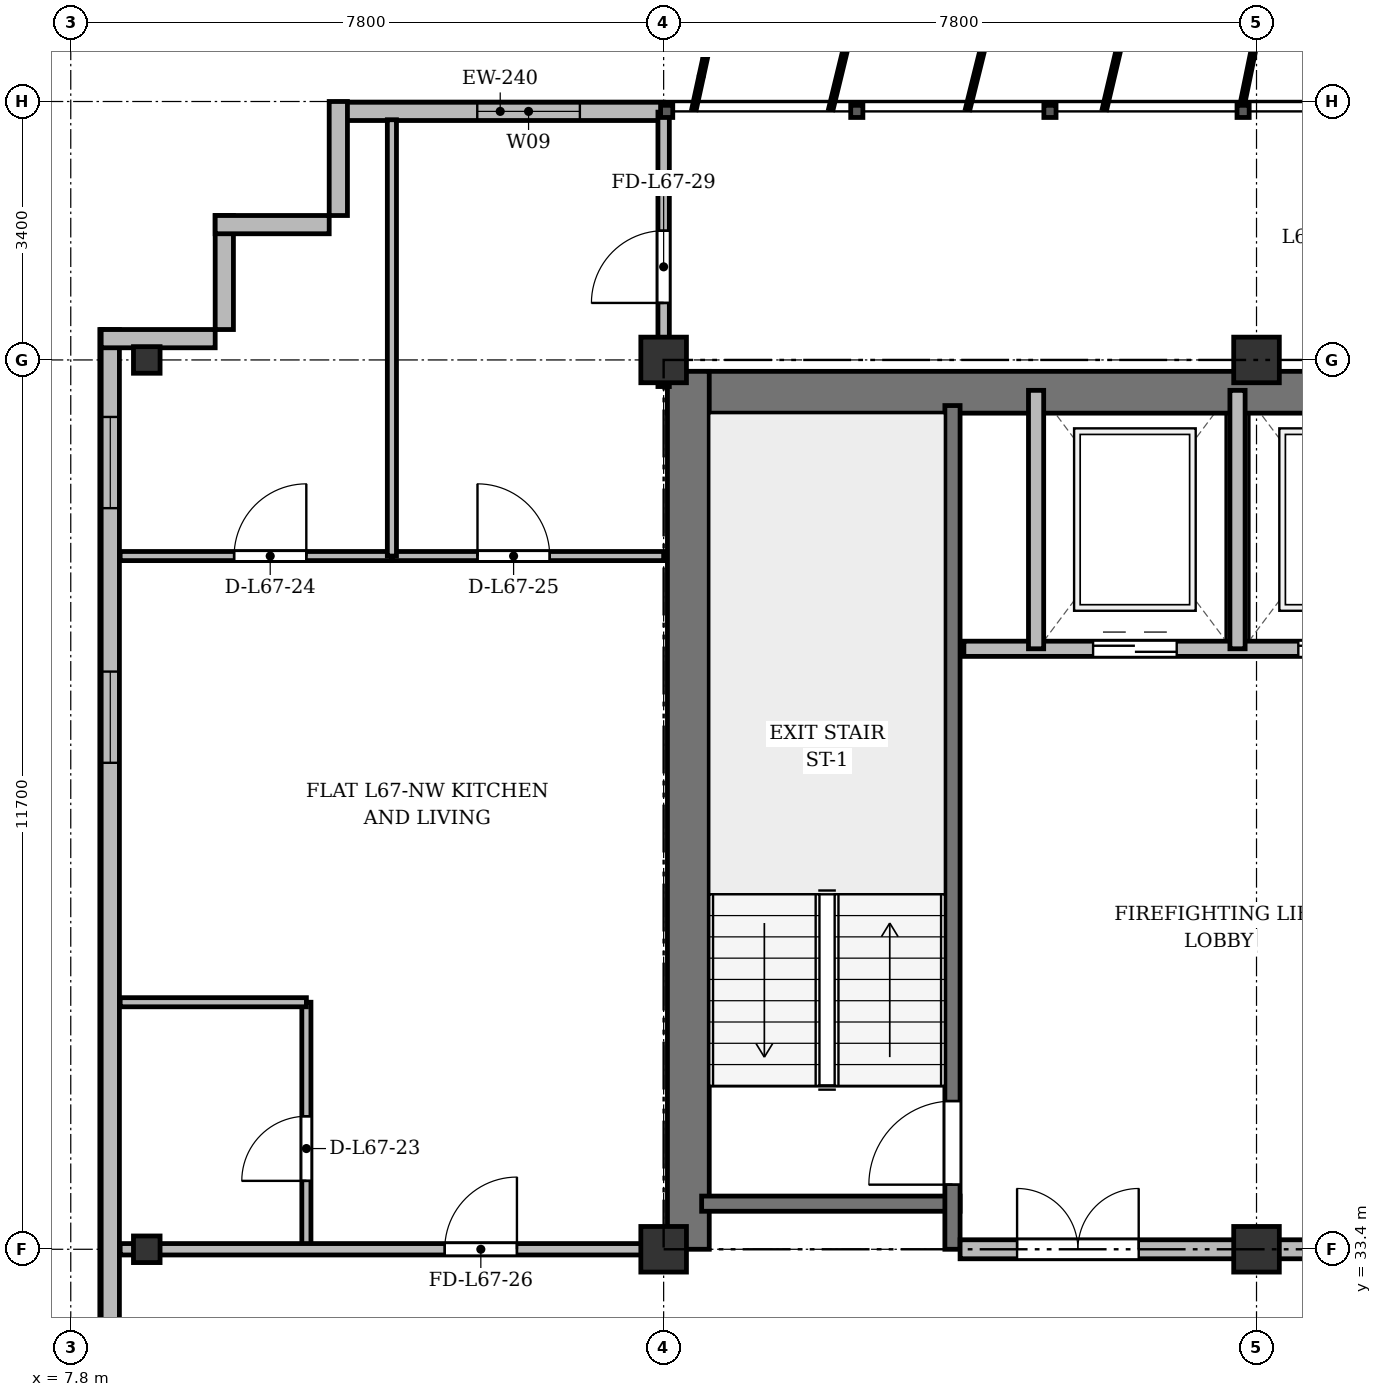
"""IFC4 building model, lengths in metres.
Left out: names, types, materials, properties, quantities, classifications, styles, units other than length and angle.
Written with IfcOpenShell. Run it as: python <this file> out.ifc"""

import sys

from ifc_helpers import new_model, si_unit, direction, frame, frame_2d, origin, origin_2d, place, context, subcontext, project, spatial, rectangle, i_section, extrude, source, transform, mapped, element, fill, save


model = new_model("IFC4")
c1 = context("Model", 3, precision=1e-05, world=origin(), true_north=direction((0.0, 1.0)))
c2 = subcontext(c1, "Body", "Model", "MODEL_VIEW")
j1 = project(units=[si_unit("LENGTHUNIT", "METRE"), si_unit("PLANEANGLEUNIT", "RADIAN")], contexts=[c1])
p1 = place(None, origin())
s1 = spatial("IfcSite", under=j1, at=p1, CompositionType="ELEMENT")
p2 = place(p1, origin())
s2 = spatial("IfcBuilding", under=s1, at=p2, CompositionType="ELEMENT")
p3 = place(p2, frame((0.0, 0.0, 259.5)))
s3 = spatial("IfcBuildingStorey", under=s2, at=p3, CompositionType="ELEMENT", Elevation=259.5)
m1 = source(origin(), c2, "Body", "SweptSolid", [
    extrude(i_section(OverallWidth=0.35, OverallDepth=0.35, WebThickness=0.018, FlangeThickness=0.028, at=origin_2d()), origin(), (0.0, 0.0, 1.0), 3.6),
])
for number, where, z_axis, x_axis in (
    (1, (8.8, 33.4, 0.0), (0.0, 0.0, 1.0), (1.0, 0.0, 0.0)),
    (2, (8.8, 45.1, 0.0), (0.0, 0.0, 1.0), (1.0, 0.0, 0.0)),
):
    element("IfcColumn", number, at=place(p3, frame(where, z_axis=z_axis, x_axis=x_axis)), inside=s3, PredefinedType="COLUMN", context=c2, shape_type="MappedRepresentation", body=[
        mapped(m1, transform((0.0, 0.0, 0.0), x_axis=(1.0, 0.0, 0.0), y_axis=(0.0, 1.0, 0.0), z_axis=(0.0, 0.0, 1.0), scale=1.0)),
    ])
m2 = source(origin(), c2, "Body", "SweptSolid", [
    extrude(rectangle(XDim=0.6, YDim=0.6, at=origin_2d()), origin(), (0.0, 0.0, 1.0), 3.6),
])
for number, where, z_axis, x_axis in (
    (3, (15.6, 33.4, 0.0), (0.0, 0.0, 1.0), (1.0, 0.0, 0.0)),
    (4, (15.6, 45.1, 0.0), (0.0, 0.0, 1.0), (1.0, 0.0, 0.0)),
    (5, (23.4, 33.4, 0.0), (0.0, 0.0, 1.0), (1.0, 0.0, 0.0)),
    (6, (23.4, 45.1, 0.0), (0.0, 0.0, 1.0), (1.0, 0.0, 0.0)),
):
    element("IfcColumn", number, at=place(p3, frame(where, z_axis=z_axis, x_axis=x_axis)), inside=s3, PredefinedType="COLUMN", context=c2, shape_type="MappedRepresentation", body=[
        mapped(m2, transform((0.0, 0.0, 0.0), x_axis=(1.0, 0.0, 0.0), y_axis=(0.0, 1.0, 0.0), z_axis=(0.0, 0.0, 1.0), scale=1.0)),
    ])
p4 = place(p3, frame((11.3, 48.37, 0.0), z_axis=(0.0, 0.0, 1.0), x_axis=(1.0, 0.0, 0.0)))
e7 = element("IfcWall", 7, at=p4, inside=s3, PredefinedType="SOLIDWALL", context=c2, shape_type="SweptSolid", body=[
    extrude(rectangle(XDim=4.3, YDim=0.24, at=frame_2d((2.15, 0.0))), origin(), (0.0, 0.0, 1.0), 3.37),
])
p5 = place(p4, frame((1.848, 0.0, 0.9)))
e8 = element("IfcOpeningElement", 8, at=p5, cuts=e7, PredefinedType="OPENING", context=c2, shape_type="SweptSolid", body=[
    extrude(rectangle(XDim=1.35, YDim=1.5, at=frame_2d((0.675, 0.75))), frame((0.0, 0.13, 0.0), z_axis=(0.0, -1.0, 0.0), x_axis=(1.0, 0.0, 0.0)), (0.0, 0.0, 1.0), 0.26),
])
p6 = place(p3, frame((8.32, 6.5, 0.0), z_axis=(0.0, 0.0, 1.0), x_axis=(0.0, 1.0, 0.0)))
e9 = element("IfcWall", 9, at=p6, inside=s3, PredefinedType="SOLIDWALL", context=c2, shape_type="SweptSolid", body=[
    extrude(rectangle(XDim=39.0, YDim=0.24, at=frame_2d((19.5, 0.0))), origin(), (0.0, 0.0, 1.0), 3.37),
])
p7 = place(p6, frame((1.45, 0.0, 0.92)))
e10 = element("IfcOpeningElement", 10, at=p7, cuts=e9, PredefinedType="OPENING", context=c2, shape_type="SweptSolid", body=[
    extrude(rectangle(XDim=1.2, YDim=1.65, at=frame_2d((0.6, 0.825))), frame((0.0, 0.13, 0.0), z_axis=(0.0, -1.0, 0.0), x_axis=(1.0, 0.0, 0.0)), (0.0, 0.0, 1.0), 0.26),
])
p8 = place(p6, frame((3.7, 0.0, 0.92)))
e11 = element("IfcOpeningElement", 11, at=p8, cuts=e9, PredefinedType="OPENING", context=c2, shape_type="SweptSolid", body=[
    extrude(rectangle(XDim=2.4, YDim=2.1, at=frame_2d((1.2, 1.05))), frame((0.0, 0.13, 0.0), z_axis=(0.0, -1.0, 0.0), x_axis=(1.0, 0.0, 0.0)), (0.0, 0.0, 1.0), 0.26),
])
p9 = place(p6, frame((7.9, 0.0, 0.92)))
e12 = element("IfcOpeningElement", 12, at=p9, cuts=e9, PredefinedType="OPENING", context=c2, shape_type="SweptSolid", body=[
    extrude(rectangle(XDim=2.4, YDim=2.1, at=frame_2d((1.2, 1.05))), frame((0.0, 0.13, 0.0), z_axis=(0.0, -1.0, 0.0), x_axis=(1.0, 0.0, 0.0)), (0.0, 0.0, 1.0), 0.26),
])
p10 = place(p6, frame((15.1, 0.0, 0.92)))
e13 = element("IfcOpeningElement", 13, at=p10, cuts=e9, PredefinedType="OPENING", context=c2, shape_type="SweptSolid", body=[
    extrude(rectangle(XDim=2.4, YDim=2.1, at=frame_2d((1.2, 1.05))), frame((0.0, 0.13, 0.0), z_axis=(0.0, -1.0, 0.0), x_axis=(1.0, 0.0, 0.0)), (0.0, 0.0, 1.0), 0.26),
])
p11 = place(p6, frame((33.3, 0.0, 0.92)))
e14 = element("IfcOpeningElement", 14, at=p11, cuts=e9, PredefinedType="OPENING", context=c2, shape_type="SweptSolid", body=[
    extrude(rectangle(XDim=1.2, YDim=1.65, at=frame_2d((0.6, 0.825))), frame((0.0, 0.13, 0.0), z_axis=(0.0, -1.0, 0.0), x_axis=(1.0, 0.0, 0.0)), (0.0, 0.0, 1.0), 0.26),
])
p12 = place(p6, frame((36.65, 0.0, 0.92)))
e15 = element("IfcOpeningElement", 15, at=p12, cuts=e9, PredefinedType="OPENING", context=c2, shape_type="SweptSolid", body=[
    extrude(rectangle(XDim=1.2, YDim=1.65, at=frame_2d((0.6, 0.825))), frame((0.0, 0.13, 0.0), z_axis=(0.0, -1.0, 0.0), x_axis=(1.0, 0.0, 0.0)), (0.0, 0.0, 1.0), 0.26),
])
for number, where, z_axis, x_axis in (
    (16, (8.2, 45.38, 0.0), (0.0, 0.0, 1.0), (1.0, 0.0, 0.0)),
    (17, (9.82, 45.5, 0.0), (0.0, 0.0, 1.0), (0.0, 1.0, 0.0)),
    (18, (9.7, 46.88, 0.0), (0.0, 0.0, 1.0), (1.0, 0.0, 0.0)),
    (19, (11.32, 47.0, 0.0), (0.0, 0.0, 1.0), (0.0, 1.0, 0.0)),
):
    element("IfcWall", number, at=place(p3, frame(where, z_axis=z_axis, x_axis=x_axis)), inside=s3, PredefinedType="SOLIDWALL", context=c2, shape_type="SweptSolid", body=[
        extrude(rectangle(XDim=1.5, YDim=0.24, at=frame_2d((0.75, 0.0))), origin(), (0.0, 0.0, 1.0), 3.37),
    ])
p13 = place(p3, frame((15.65, 44.675, 0.0), z_axis=(0.0, 0.0, 1.0), x_axis=(1.0, 0.0, 0.0)))
e20 = element("IfcWall", 20, at=p13, inside=s3, PredefinedType="SHEAR", context=c2, shape_type="SweptSolid", body=[
    extrude(rectangle(XDim=43.1, YDim=0.55, at=frame_2d((21.55, 0.0))), origin(), (0.0, 0.0, 1.0), 3.37),
])
p14 = place(p3, frame((15.925, 33.4, 0.0), z_axis=(0.0, 0.0, 1.0), x_axis=(0.0, 1.0, 0.0)))
e21 = element("IfcWall", 21, at=p14, inside=s3, PredefinedType="SHEAR", context=c2, shape_type="SweptSolid", body=[
    extrude(rectangle(XDim=11.55, YDim=0.55, at=frame_2d((5.775, 0.0))), origin(), (0.0, 0.0, 1.0), 3.37),
])
p15 = place(p3, frame((16.1, 34.0, 0.0), z_axis=(0.0, 0.0, 1.0), x_axis=(1.0, 0.0, 0.0)))
e22 = element("IfcWall", 22, at=p15, inside=s3, PredefinedType="SHEAR", context=c2, shape_type="SweptSolid", body=[
    extrude(rectangle(XDim=3.4, YDim=0.2, at=frame_2d((1.7, 0.0))), origin(), (0.0, 0.0, 1.0), 3.37),
])
p16 = place(p3, frame((19.4, 33.4, 0.0), z_axis=(0.0, 0.0, 1.0), x_axis=(0.0, 1.0, 0.0)))
e23 = element("IfcWall", 23, at=p16, inside=s3, PredefinedType="SHEAR", context=c2, shape_type="SweptSolid", body=[
    extrude(rectangle(XDim=11.1, YDim=0.2, at=frame_2d((5.55, 0.0))), origin(), (0.0, 0.0, 1.0), 3.37),
])
p17 = place(p16, frame((0.85, 0.0, 0.0)))
e24 = element("IfcOpeningElement", 24, at=p17, cuts=e23, PredefinedType="OPENING", context=c2, shape_type="SweptSolid", body=[
    extrude(rectangle(XDim=1.1, YDim=2.15, at=frame_2d((0.55, 1.075))), frame((0.0, 0.11, 0.0), z_axis=(0.0, -1.0, 0.0), x_axis=(1.0, 0.0, 0.0)), (0.0, 0.0, 1.0), 0.22),
])
p18 = place(p3, frame((19.55, 41.3, 0.0), z_axis=(0.0, 0.0, 1.0), x_axis=(1.0, 0.0, 0.0)))
e25 = element("IfcWall", 25, at=p18, inside=s3, PredefinedType="SOLIDWALL", context=c2, shape_type="SweptSolid", body=[
    extrude(rectangle(XDim=6.75, YDim=0.2, at=frame_2d((3.375, 0.0))), origin(), (0.0, 0.0, 1.0), 3.37),
])
p19 = place(p18, frame((1.7, 0.0, 0.0)))
e26 = element("IfcOpeningElement", 26, at=p19, cuts=e25, PredefinedType="OPENING", context=c2, shape_type="SweptSolid", body=[
    extrude(rectangle(XDim=1.1, YDim=2.15, at=frame_2d((0.55, 1.075))), frame((0.0, 0.11, 0.0), z_axis=(0.0, -1.0, 0.0), x_axis=(1.0, 0.0, 0.0)), (0.0, 0.0, 1.0), 0.22),
])
p20 = place(p18, frame((4.4, 0.0, 0.0)))
e27 = element("IfcOpeningElement", 27, at=p20, cuts=e25, PredefinedType="OPENING", context=c2, shape_type="SweptSolid", body=[
    extrude(rectangle(XDim=1.1, YDim=2.15, at=frame_2d((0.55, 1.075))), frame((0.0, 0.11, 0.0), z_axis=(0.0, -1.0, 0.0), x_axis=(1.0, 0.0, 0.0)), (0.0, 0.0, 1.0), 0.22),
])
for number, where, z_axis, x_axis in (
    (28, (20.5, 41.3, 0.0), (0.0, 0.0, 1.0), (0.0, 1.0, 0.0)),
    (29, (23.15, 41.3, 0.0), (0.0, 0.0, 1.0), (0.0, 1.0, 0.0)),
):
    element("IfcWall", number, at=place(p3, frame(where, z_axis=z_axis, x_axis=x_axis)), inside=s3, PredefinedType="SOLIDWALL", context=c2, shape_type="SweptSolid", body=[
        extrude(rectangle(XDim=3.4, YDim=0.2, at=frame_2d((1.7, 0.0))), origin(), (0.0, 0.0, 1.0), 3.37),
    ])
p21 = place(p3, frame((19.5, 33.4, 0.0), z_axis=(0.0, 0.0, 1.0), x_axis=(1.0, 0.0, 0.0)))
e30 = element("IfcWall", 30, at=p21, inside=s3, PredefinedType="PARTITIONING", context=c2, shape_type="SweptSolid", body=[
    extrude(rectangle(XDim=6.8, YDim=0.25, at=frame_2d((3.4, 0.0))), origin(), (0.0, 0.0, 1.0), 2.92),
])
p22 = place(p21, frame((0.75, 0.0, 0.0)))
e31 = element("IfcOpeningElement", 31, at=p22, cuts=e30, PredefinedType="OPENING", context=c2, shape_type="SweptSolid", body=[
    extrude(rectangle(XDim=1.6, YDim=2.2, at=frame_2d((0.8, 1.1))), frame((0.0, 0.135, 0.0), z_axis=(0.0, -1.0, 0.0), x_axis=(1.0, 0.0, 0.0)), (0.0, 0.0, 1.0), 0.27),
])
p23 = place(p3, frame((10.9, 33.4, 0.0), z_axis=(0.0, 0.0, 1.0), x_axis=(0.0, 1.0, 0.0)))
e32 = element("IfcWall", 32, at=p23, inside=s3, PredefinedType="PARTITIONING", context=c2, shape_type="SweptSolid", body=[
    extrude(rectangle(XDim=3.25, YDim=0.12, at=frame_2d((1.625, 0.0))), origin(), (0.0, 0.0, 1.0), 2.92),
])
p24 = place(p23, frame((0.9, 0.0, 0.0)))
e33 = element("IfcOpeningElement", 33, at=p24, cuts=e32, PredefinedType="OPENING", context=c2, shape_type="SweptSolid", body=[
    extrude(rectangle(XDim=0.85, YDim=2.1, at=frame_2d((0.425, 1.05))), frame((0.0, 0.07, 0.0), z_axis=(0.0, -1.0, 0.0), x_axis=(1.0, 0.0, 0.0)), (0.0, 0.0, 1.0), 0.14),
])
p25 = place(p3, frame((8.45, 36.65, 0.0), z_axis=(0.0, 0.0, 1.0), x_axis=(1.0, 0.0, 0.0)))
e34 = element("IfcWall", 34, at=p25, inside=s3, PredefinedType="PARTITIONING", context=c2, shape_type="SweptSolid", body=[
    extrude(rectangle(XDim=2.45, YDim=0.12, at=frame_2d((1.225, 0.0))), origin(), (0.0, 0.0, 1.0), 2.87),
])
p26 = place(p3, frame((8.45, 42.52, 0.0), z_axis=(0.0, 0.0, 1.0), x_axis=(1.0, 0.0, 0.0)))
e35 = element("IfcWall", 35, at=p26, inside=s3, PredefinedType="PARTITIONING", context=c2, shape_type="SweptSolid", body=[
    extrude(rectangle(XDim=3.575, YDim=0.12, at=frame_2d((1.788, 0.0))), origin(), (0.0, 0.0, 1.0), 2.87),
])
p27 = place(p26, frame((1.499, 0.0, 0.0)))
e36 = element("IfcOpeningElement", 36, at=p27, cuts=e35, PredefinedType="OPENING", context=c2, shape_type="SweptSolid", body=[
    extrude(rectangle(XDim=0.95, YDim=2.15, at=frame_2d((0.475, 1.075))), frame((0.0, 0.07, 0.0), z_axis=(0.0, -1.0, 0.0), x_axis=(1.0, 0.0, 0.0)), (0.0, 0.0, 1.0), 0.14),
])
p28 = place(p3, frame((12.025, 42.52, 0.0), z_axis=(0.0, 0.0, 1.0), x_axis=(1.0, 0.0, 0.0)))
e37 = element("IfcWall", 37, at=p28, inside=s3, PredefinedType="PARTITIONING", context=c2, shape_type="SweptSolid", body=[
    extrude(rectangle(XDim=3.575, YDim=0.12, at=frame_2d((1.788, 0.0))), origin(), (0.0, 0.0, 1.0), 2.87),
])
p29 = place(p28, frame((1.126, 0.0, 0.0)))
e38 = element("IfcOpeningElement", 38, at=p29, cuts=e37, PredefinedType="OPENING", context=c2, shape_type="SweptSolid", body=[
    extrude(rectangle(XDim=0.95, YDim=2.15, at=frame_2d((0.475, 1.075))), frame((0.0, 0.07, 0.0), z_axis=(0.0, -1.0, 0.0), x_axis=(1.0, 0.0, 0.0)), (0.0, 0.0, 1.0), 0.14),
])
p30 = place(p3, frame((12.025, 42.52, 0.0), z_axis=(0.0, 0.0, 1.0), x_axis=(0.0, 1.0, 0.0)))
e39 = element("IfcWall", 39, at=p30, inside=s3, PredefinedType="PARTITIONING", context=c2, shape_type="SweptSolid", body=[
    extrude(rectangle(XDim=5.74, YDim=0.12, at=frame_2d((2.87, 0.0))), origin(), (0.0, 0.0, 1.0), 2.92),
])
p31 = place(p3, frame((8.45, 33.4, 0.0), z_axis=(0.0, 0.0, 1.0), x_axis=(1.0, 0.0, 0.0)))
e40 = element("IfcWall", 40, at=p31, inside=s3, PredefinedType="PARTITIONING", context=c2, shape_type="SweptSolid", body=[
    extrude(rectangle(XDim=7.15, YDim=0.15, at=frame_2d((3.575, 0.0))), origin(), (0.0, 0.0, 1.0), 2.92),
])
p32 = place(p31, frame((4.27, 0.0, 0.0)))
e41 = element("IfcOpeningElement", 41, at=p32, cuts=e40, PredefinedType="OPENING", context=c2, shape_type="SweptSolid", body=[
    extrude(rectangle(XDim=0.95, YDim=2.15, at=frame_2d((0.475, 1.075))), frame((0.0, 0.085, 0.0), z_axis=(0.0, -1.0, 0.0), x_axis=(1.0, 0.0, 0.0)), (0.0, 0.0, 1.0), 0.17),
])
p33 = place(p3, frame((15.6, 44.75, 0.0), z_axis=(0.0, 0.0, 1.0), x_axis=(0.0, 1.0, 0.0)))
e42 = element("IfcWall", 42, at=p33, inside=s3, PredefinedType="PARTITIONING", context=c2, shape_type="SweptSolid", body=[
    extrude(rectangle(XDim=3.61, YDim=0.15, at=frame_2d((1.805, 0.0))), origin(), (0.0, 0.0, 1.0), 2.87),
])
p34 = place(p33, frame((1.1, 0.0, 0.0)))
e43 = element("IfcOpeningElement", 43, at=p34, cuts=e42, PredefinedType="OPENING", context=c2, shape_type="SweptSolid", body=[
    extrude(rectangle(XDim=0.95, YDim=2.15, at=frame_2d((0.475, 1.075))), frame((0.0, 0.085, 0.0), z_axis=(0.0, -1.0, 0.0), x_axis=(1.0, 0.0, 0.0)), (0.0, 0.0, 1.0), 0.17),
])
m3 = source(origin(), c2, "Body", "SweptSolid", [
    extrude(rectangle(XDim=1.35, YDim=1.5, at=frame_2d((0.675, 0.75))), frame((0.0, 0.03, 0.0), z_axis=(0.0, -1.0, 0.0), x_axis=(1.0, 0.0, 0.0)), (0.0, 0.0, 1.0), 0.06),
])
p35 = place(p5, origin())
e44 = element("IfcWindow", 44, at=p35, inside=s3, PartitioningType="SINGLE_PANEL", PredefinedType="WINDOW", context=c2, shape_type="MappedRepresentation", body=[
    mapped(m3, transform((0.0, 0.0, 0.0), x_axis=(1.0, 0.0, 0.0), y_axis=(0.0, 1.0, 0.0), z_axis=(0.0, 0.0, 1.0), scale=1.0)),
])
fill(e8, e44)
m4 = source(origin(), c2, "Body", "SweptSolid", [
    extrude(rectangle(XDim=1.2, YDim=1.65, at=frame_2d((0.6, 0.825))), frame((0.0, 0.03, 0.0), z_axis=(0.0, -1.0, 0.0), x_axis=(1.0, 0.0, 0.0)), (0.0, 0.0, 1.0), 0.06),
])
p36 = place(p11, origin())
e45 = element("IfcWindow", 45, at=p36, inside=s3, PartitioningType="SINGLE_PANEL", PredefinedType="WINDOW", context=c2, shape_type="MappedRepresentation", body=[
    mapped(m4, transform((0.0, 0.0, 0.0), x_axis=(1.0, 0.0, 0.0), y_axis=(0.0, 1.0, 0.0), z_axis=(0.0, 0.0, 1.0), scale=1.0)),
])
fill(e14, e45)
p37 = place(p12, origin())
e46 = element("IfcWindow", 46, at=p37, inside=s3, PartitioningType="SINGLE_PANEL", PredefinedType="WINDOW", context=c2, shape_type="MappedRepresentation", body=[
    mapped(m4, transform((0.0, 0.0, 0.0), x_axis=(1.0, 0.0, 0.0), y_axis=(0.0, 1.0, 0.0), z_axis=(0.0, 0.0, 1.0), scale=1.0)),
])
fill(e15, e46)
m5 = source(origin(), c2, "Body", "SweptSolid", [
    extrude(rectangle(XDim=1.1, YDim=2.15, at=frame_2d((0.55, 1.075))), frame((0.0, 0.025, 0.0), z_axis=(0.0, -1.0, 0.0), x_axis=(1.0, 0.0, 0.0)), (0.0, 0.0, 1.0), 0.05),
])
p38 = place(p17, origin())
e47 = element("IfcDoor", 47, at=p38, inside=s3, OperationType="SINGLE_SWING_LEFT", PredefinedType="DOOR", context=c2, shape_type="MappedRepresentation", body=[
    mapped(m5, transform((0.0, 0.0, 0.0), x_axis=(1.0, 0.0, 0.0), y_axis=(0.0, 1.0, 0.0), z_axis=(0.0, 0.0, 1.0), scale=1.0)),
])
fill(e24, e47)
p39 = place(p19, origin())
e48 = element("IfcDoor", 48, at=p39, inside=s3, OperationType="DOUBLE_DOOR_SLIDING", PredefinedType="DOOR", context=c2, shape_type="MappedRepresentation", body=[
    mapped(m5, transform((0.0, 0.0, 0.0), x_axis=(1.0, 0.0, 0.0), y_axis=(0.0, 1.0, 0.0), z_axis=(0.0, 0.0, 1.0), scale=1.0)),
])
fill(e26, e48)
p40 = place(p20, origin())
e49 = element("IfcDoor", 49, at=p40, inside=s3, OperationType="DOUBLE_DOOR_SLIDING", PredefinedType="DOOR", context=c2, shape_type="MappedRepresentation", body=[
    mapped(m5, transform((0.0, 0.0, 0.0), x_axis=(1.0, 0.0, 0.0), y_axis=(0.0, 1.0, 0.0), z_axis=(0.0, 0.0, 1.0), scale=1.0)),
])
fill(e27, e49)
m6 = source(origin(), c2, "Body", "SweptSolid", [
    extrude(rectangle(XDim=1.6, YDim=2.2, at=frame_2d((0.8, 1.1))), frame((0.0, 0.025, 0.0), z_axis=(0.0, -1.0, 0.0), x_axis=(1.0, 0.0, 0.0)), (0.0, 0.0, 1.0), 0.05),
])
p41 = place(p22, origin())
e50 = element("IfcDoor", 50, at=p41, inside=s3, OperationType="DOUBLE_DOOR_SINGLE_SWING", PredefinedType="DOOR", context=c2, shape_type="MappedRepresentation", body=[
    mapped(m6, transform((0.0, 0.0, 0.0), x_axis=(1.0, 0.0, 0.0), y_axis=(0.0, 1.0, 0.0), z_axis=(0.0, 0.0, 1.0), scale=1.0)),
])
fill(e31, e50)
m7 = source(origin(), c2, "Body", "SweptSolid", [
    extrude(rectangle(XDim=0.85, YDim=2.1, at=frame_2d((0.425, 1.05))), frame((0.0, 0.025, 0.0), z_axis=(0.0, -1.0, 0.0), x_axis=(1.0, 0.0, 0.0)), (0.0, 0.0, 1.0), 0.05),
])
p42 = place(p24, origin())
e51 = element("IfcDoor", 51, at=p42, inside=s3, OperationType="SINGLE_SWING_LEFT", PredefinedType="DOOR", context=c2, shape_type="MappedRepresentation", body=[
    mapped(m7, transform((0.0, 0.0, 0.0), x_axis=(1.0, 0.0, 0.0), y_axis=(0.0, 1.0, 0.0), z_axis=(0.0, 0.0, 1.0), scale=1.0)),
])
fill(e33, e51)
m8 = source(origin(), c2, "Body", "SweptSolid", [
    extrude(rectangle(XDim=0.95, YDim=2.15, at=frame_2d((0.475, 1.075))), frame((0.0, 0.025, 0.0), z_axis=(0.0, -1.0, 0.0), x_axis=(1.0, 0.0, 0.0)), (0.0, 0.0, 1.0), 0.05),
])
p43 = place(p27, origin())
e52 = element("IfcDoor", 52, at=p43, inside=s3, OperationType="SINGLE_SWING_RIGHT", PredefinedType="DOOR", context=c2, shape_type="MappedRepresentation", body=[
    mapped(m8, transform((0.0, 0.0, 0.0), x_axis=(1.0, 0.0, 0.0), y_axis=(0.0, 1.0, 0.0), z_axis=(0.0, 0.0, 1.0), scale=1.0)),
])
fill(e36, e52)
p44 = place(p29, origin())
e53 = element("IfcDoor", 53, at=p44, inside=s3, OperationType="SINGLE_SWING_LEFT", PredefinedType="DOOR", context=c2, shape_type="MappedRepresentation", body=[
    mapped(m8, transform((0.0, 0.0, 0.0), x_axis=(1.0, 0.0, 0.0), y_axis=(0.0, 1.0, 0.0), z_axis=(0.0, 0.0, 1.0), scale=1.0)),
])
fill(e38, e53)
p45 = place(p32, origin())
e54 = element("IfcDoor", 54, at=p45, inside=s3, OperationType="SINGLE_SWING_RIGHT", PredefinedType="DOOR", context=c2, shape_type="MappedRepresentation", body=[
    mapped(m8, transform((0.0, 0.0, 0.0), x_axis=(1.0, 0.0, 0.0), y_axis=(0.0, 1.0, 0.0), z_axis=(0.0, 0.0, 1.0), scale=1.0)),
])
fill(e41, e54)
p46 = place(p34, origin())
e55 = element("IfcDoor", 55, at=p46, inside=s3, OperationType="SINGLE_SWING_LEFT", PredefinedType="DOOR", context=c2, shape_type="MappedRepresentation", body=[
    mapped(m8, transform((0.0, 0.0, 0.0), x_axis=(1.0, 0.0, 0.0), y_axis=(0.0, 1.0, 0.0), z_axis=(0.0, 0.0, 1.0), scale=1.0)),
])
fill(e43, e55)
save(model, sys.argv[1])
